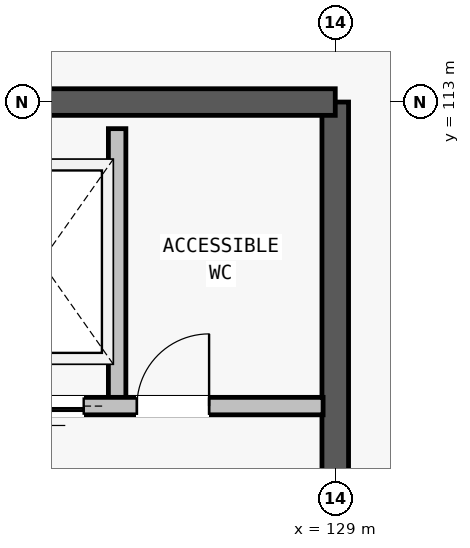
"""IFC4 building model, lengths in metres.
Left out: names, types, materials, properties, quantities, classifications, styles, units other than length and angle.
Written with IfcOpenShell. Run it as: python <this file> out.ifc"""

import sys

from ifc_helpers import new_model, si_unit, direction, frame, frame_2d, origin, place, context, subcontext, project, spatial, rectangle, extrude, element, fill, save


model = new_model("IFC4")
c1 = context("Model", 3, precision=1e-05, world=origin(), true_north=direction((0.0, 1.0)))
c2 = subcontext(c1, "Body", "Model", "MODEL_VIEW")
j1 = project(units=[si_unit("LENGTHUNIT", "METRE"), si_unit("PLANEANGLEUNIT", "RADIAN")], contexts=[c1])
p1 = place(None, origin())
s1 = spatial("IfcSite", under=j1, at=p1, CompositionType="ELEMENT")
p2 = place(p1, origin())
s2 = spatial("IfcBuilding", under=s1, at=p2, CompositionType="ELEMENT")
p3 = place(p2, frame((0.0, 0.0, 9.5)))
s3 = spatial("IfcBuildingStorey", under=s2, at=p3, CompositionType="ELEMENT", Elevation=9.5)
p4 = place(p3, frame((129.0, 104.0, 0.0), z_axis=(0.0, 0.0, 1.0), x_axis=(0.0, 1.0, 0.0)))
e1 = element("IfcWall", 1, at=p4, inside=s3, PredefinedType="SHEAR", context=c2, shape_type="SweptSolid", body=[
    extrude(rectangle(XDim=9.0, YDim=0.35, at=frame_2d((4.5, 0.0))), origin(), (0.0, 0.0, 1.0), 3.62),
])
p5 = place(p4, frame((1.4, 0.0, 0.0)))
e2 = element("IfcOpeningElement", 2, at=p5, cuts=e1, PredefinedType="OPENING", context=c2, shape_type="SweptSolid", body=[
    extrude(rectangle(XDim=1.9, YDim=2.3, at=frame_2d((0.95, 1.15))), frame((0.0, 0.185, 0.0), z_axis=(0.0, -1.0, 0.0), x_axis=(1.0, 0.0, 0.0)), (0.0, 0.0, 1.0), 0.37),
])
p6 = place(p3, frame((129.0, 113.0, 0.0), z_axis=(0.0, 0.0, 1.0), x_axis=(-1.0, 0.0, 0.0)))
e3 = element("IfcWall", 3, at=p6, inside=s3, PredefinedType="SHEAR", context=c2, shape_type="SweptSolid", body=[
    extrude(rectangle(XDim=9.0, YDim=0.35, at=frame_2d((4.5, 0.0))), origin(), (0.0, 0.0, 1.0), 3.62),
])
p7 = place(p3, frame((126.13, 109.0, 0.0), z_axis=(0.0, 0.0, 1.0), x_axis=(0.0, 1.0, 0.0)))
e4 = element("IfcWall", 4, at=p7, inside=s3, PredefinedType="PARTITIONING", context=c2, shape_type="SweptSolid", body=[
    extrude(rectangle(XDim=3.65, YDim=0.23, at=frame_2d((1.825, 0.0))), origin(), (0.0, 0.0, 1.0), 2.48),
])
p8 = place(p3, frame((124.21, 109.0, 0.0), z_axis=(0.0, 0.0, 1.0), x_axis=(1.0, 0.0, 0.0)))
e5 = element("IfcWall", 5, at=p8, inside=s3, PredefinedType="PARTITIONING", context=c2, shape_type="SweptSolid", body=[
    extrude(rectangle(XDim=4.63, YDim=0.23, at=frame_2d((2.315, 0.0))), origin(), (0.0, 0.0, 1.0), 2.48),
])
p9 = place(p8, frame((0.38, 0.0, 0.0)))
e6 = element("IfcOpeningElement", 6, at=p9, cuts=e5, PredefinedType="OPENING", context=c2, shape_type="SweptSolid", body=[
    extrude(rectangle(XDim=1.1, YDim=2.15, at=frame_2d((0.55, 1.075))), frame((0.0, 0.125, 0.0), z_axis=(0.0, -1.0, 0.0), x_axis=(1.0, 0.0, 0.0)), (0.0, 0.0, 1.0), 0.25),
])
p10 = place(p8, frame((2.18, 0.0, 0.0)))
e7 = element("IfcOpeningElement", 7, at=p10, cuts=e5, PredefinedType="OPENING", context=c2, shape_type="SweptSolid", body=[
    extrude(rectangle(XDim=0.95, YDim=2.1, at=frame_2d((0.475, 1.05))), frame((0.0, 0.125, 0.0), z_axis=(0.0, -1.0, 0.0), x_axis=(1.0, 0.0, 0.0)), (0.0, 0.0, 1.0), 0.25),
])
p11 = place(p9, origin())
e8 = element("IfcDoor", 8, at=p11, inside=s3, OperationType="SLIDING_TO_LEFT", PredefinedType="DOOR", context=c2, shape_type="SweptSolid", body=[
    extrude(rectangle(XDim=1.1, YDim=2.15, at=frame_2d((0.55, 1.075))), frame((0.0, 0.025, 0.0), z_axis=(0.0, -1.0, 0.0), x_axis=(1.0, 0.0, 0.0)), (0.0, 0.0, 1.0), 0.05),
])
fill(e6, e8)
p12 = place(p10, origin())
e9 = element("IfcDoor", 9, at=p12, inside=s3, OperationType="SINGLE_SWING_RIGHT", PredefinedType="DOOR", context=c2, shape_type="SweptSolid", body=[
    extrude(rectangle(XDim=0.95, YDim=2.1, at=frame_2d((0.475, 1.05))), frame((0.0, 0.025, 0.0), z_axis=(0.0, -1.0, 0.0), x_axis=(1.0, 0.0, 0.0)), (0.0, 0.0, 1.0), 0.05),
])
fill(e7, e9)
save(model, sys.argv[1])
